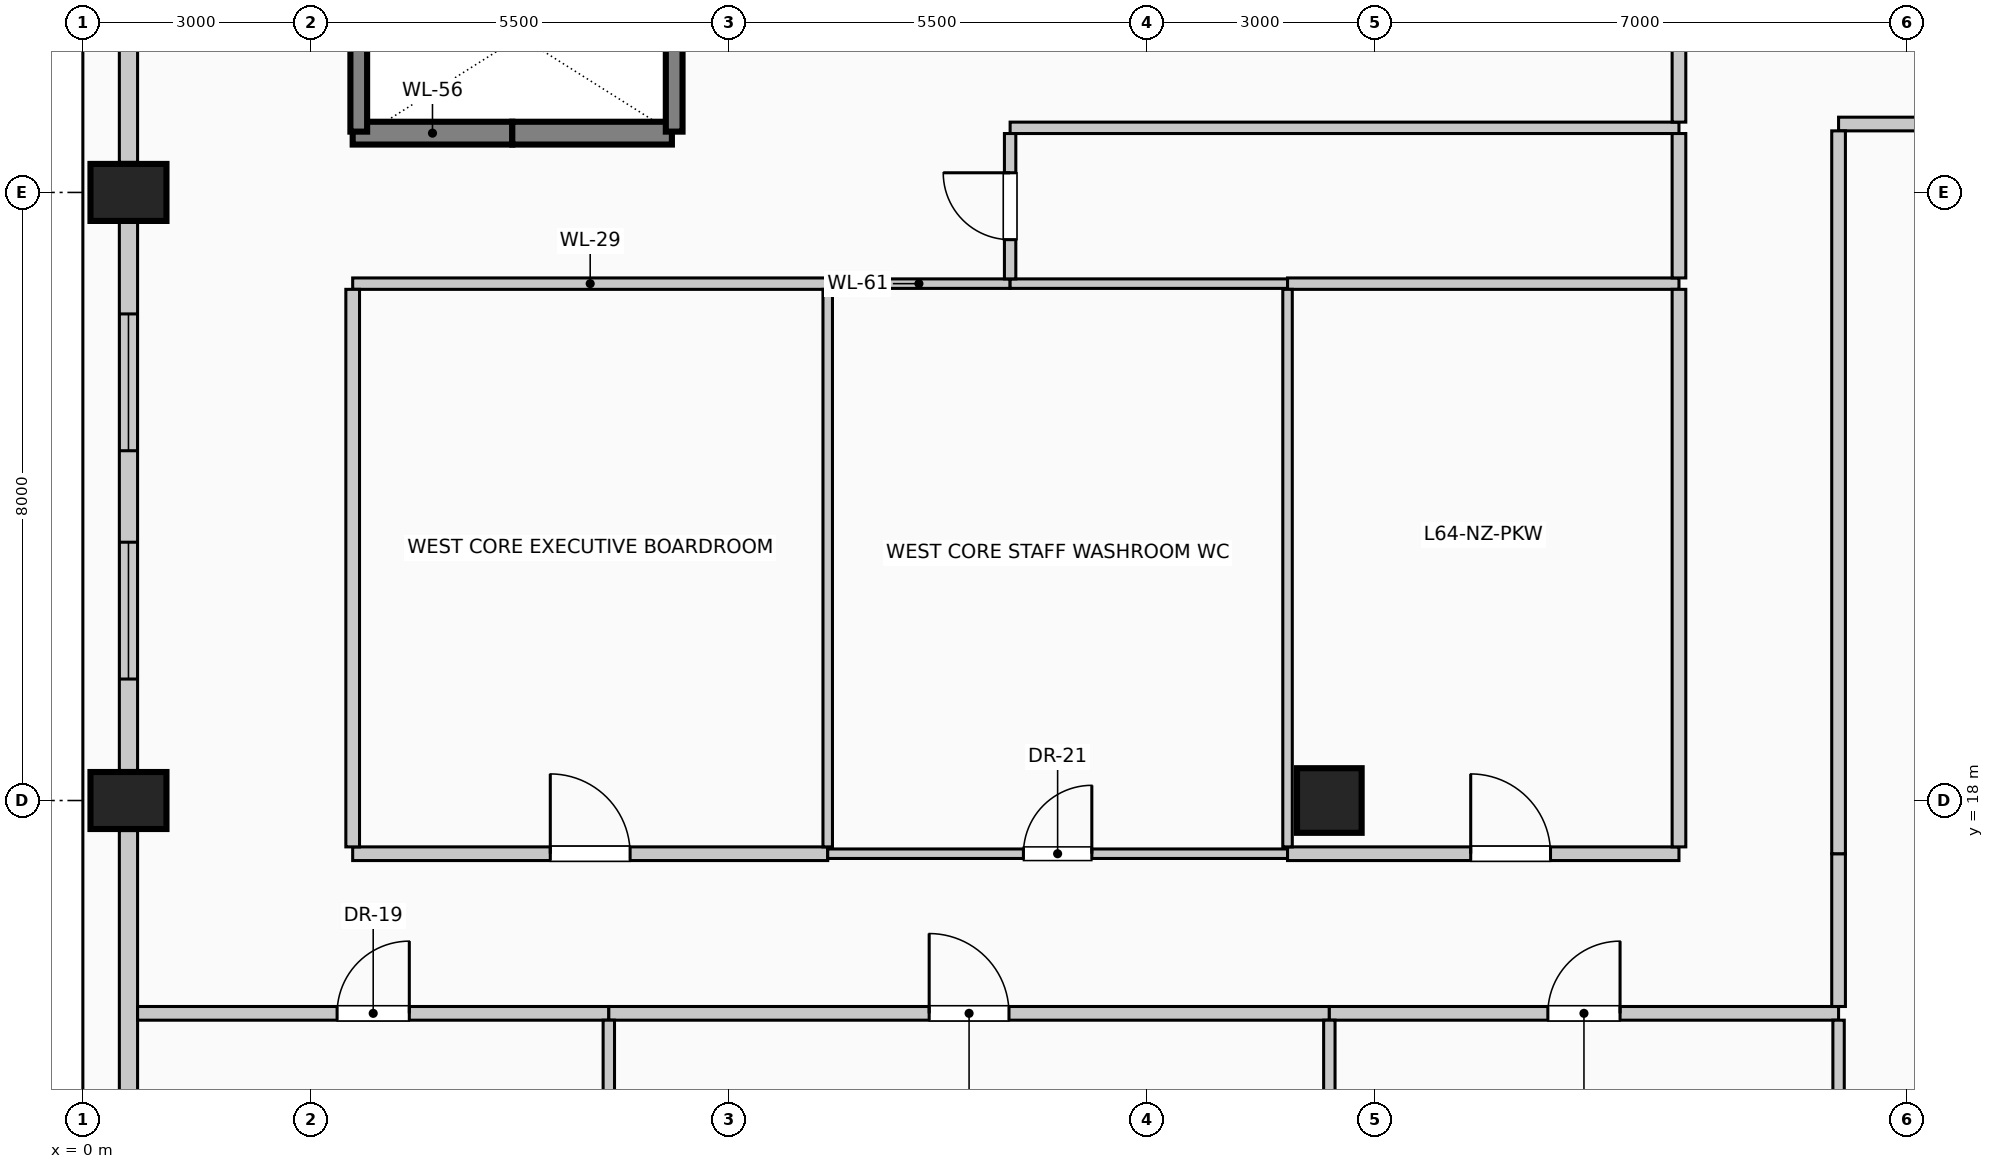
"""IFC4 building model, lengths in metres.
Left out: names, types, materials, properties, quantities, classifications, styles, units other than length and angle.
Written with IfcOpenShell. Run it as: python <this file> out.ifc"""

import sys

from ifc_helpers import new_model, si_unit, direction, frame, frame_2d, origin, origin_2d, place, context, subcontext, project, spatial, rectangle, circle, extrude, element, fill, save


model = new_model("IFC4")
c1 = context("Model", 3, precision=1e-05, world=origin(), true_north=direction((0.0, 1.0)))
c2 = subcontext(c1, "Body", "Model", "MODEL_VIEW")
j1 = project(units=[si_unit("LENGTHUNIT", "METRE"), si_unit("PLANEANGLEUNIT", "RADIAN")], contexts=[c1])
p1 = place(None, origin())
s1 = spatial("IfcSite", under=j1, at=p1, CompositionType="ELEMENT")
p2 = place(p1, origin())
s2 = spatial("IfcBuilding", under=s1, at=p2, CompositionType="ELEMENT")
p3 = place(p2, frame((0.0, 0.0, 264.6)))
s3 = spatial("IfcBuildingStorey", under=s2, at=p3, CompositionType="ELEMENT", Elevation=264.6)
for number, where, z_axis, x_axis in (
    (1, (0.6, 18.0, 0.0), (0.0, 0.0, 1.0), (0.0, 1.0, 0.0)),
    (2, (0.6, 26.0, 0.0), (0.0, 0.0, 1.0), (0.0, 1.0, 0.0)),
):
    element("IfcColumn", number, at=place(p3, frame(where, z_axis=z_axis, x_axis=x_axis)), inside=s3, PredefinedType="COLUMN", context=c2, shape_type="SweptSolid", body=[
        extrude(rectangle(XDim=0.75, YDim=1.0, at=origin_2d()), origin(), (0.0, 0.0, 1.0), 4.0),
    ])
p4 = place(p3, frame((16.4, 18.0, 0.0), z_axis=(0.0, 0.0, 1.0), x_axis=(1.0, 0.0, 0.0)))
e3 = element("IfcColumn", 3, at=p4, inside=s3, PredefinedType="COLUMN", context=c2, shape_type="SweptSolid", body=[
    extrude(circle(Radius=0.425, at=origin_2d()), origin(), (0.0, 0.0, 1.0), 4.0),
])
p5 = place(p3, frame((0.6, 10.395, 0.0), z_axis=(0.0, 0.0, 1.0), x_axis=(0.0, 1.0, 0.0)))
e4 = element("IfcWall", 4, at=p5, inside=s3, PredefinedType="SOLIDWALL", context=c2, shape_type="SweptSolid", body=[
    extrude(rectangle(XDim=7.21, YDim=0.24, at=frame_2d((3.605, 0.0))), origin(), (0.0, 0.0, 1.0), 3.0),
])
p6 = place(p5, frame((1.203, 0.0, 0.42)))
e5 = element("IfcOpeningElement", 5, at=p6, cuts=e4, PredefinedType="OPENING", context=c2, shape_type="SweptSolid", body=[
    extrude(rectangle(XDim=1.8, YDim=2.2, at=frame_2d((0.9, 1.1))), frame((0.0, 0.13, 0.0), z_axis=(0.0, -1.0, 0.0), x_axis=(1.0, 0.0, 0.0)), (0.0, 0.0, 1.0), 0.26),
])
p7 = place(p3, frame((0.6, 18.395, 0.0), z_axis=(0.0, 0.0, 1.0), x_axis=(0.0, 1.0, 0.0)))
e6 = element("IfcWall", 6, at=p7, inside=s3, PredefinedType="SOLIDWALL", context=c2, shape_type="SweptSolid", body=[
    extrude(rectangle(XDim=7.21, YDim=0.24, at=frame_2d((3.605, 0.0))), origin(), (0.0, 0.0, 1.0), 3.0),
])
p8 = place(p7, frame((1.203, 0.0, 0.42)))
e7 = element("IfcOpeningElement", 7, at=p8, cuts=e6, PredefinedType="OPENING", context=c2, shape_type="SweptSolid", body=[
    extrude(rectangle(XDim=1.8, YDim=2.2, at=frame_2d((0.9, 1.1))), frame((0.0, 0.13, 0.0), z_axis=(0.0, -1.0, 0.0), x_axis=(1.0, 0.0, 0.0)), (0.0, 0.0, 1.0), 0.26),
])
p9 = place(p7, frame((4.207, 0.0, 0.42)))
e8 = element("IfcOpeningElement", 8, at=p9, cuts=e6, PredefinedType="OPENING", context=c2, shape_type="SweptSolid", body=[
    extrude(rectangle(XDim=1.8, YDim=2.2, at=frame_2d((0.9, 1.1))), frame((0.0, 0.13, 0.0), z_axis=(0.0, -1.0, 0.0), x_axis=(1.0, 0.0, 0.0)), (0.0, 0.0, 1.0), 0.26),
])
p10 = place(p3, frame((0.6, 26.395, 0.0), z_axis=(0.0, 0.0, 1.0), x_axis=(0.0, 1.0, 0.0)))
e9 = element("IfcWall", 9, at=p10, inside=s3, PredefinedType="SOLIDWALL", context=c2, shape_type="SweptSolid", body=[
    extrude(rectangle(XDim=7.21, YDim=0.24, at=frame_2d((3.605, 0.0))), origin(), (0.0, 0.0, 1.0), 3.0),
])
p11 = place(p3, frame((5.65, 26.78, 0.0), z_axis=(0.0, 0.0, 1.0), x_axis=(-1.0, 0.0, 0.0)))
e10 = element("IfcWall", 10, at=p11, inside=s3, PredefinedType="SOLIDWALL", context=c2, shape_type="SweptSolid", body=[
    extrude(rectangle(XDim=2.1, YDim=0.3, at=frame_2d((1.05, 0.0))), origin(), (0.0, 0.0, 1.0), 4.0),
])
p12 = place(p3, frame((7.75, 26.78, 0.0), z_axis=(0.0, 0.0, 1.0), x_axis=(-1.0, 0.0, 0.0)))
e11 = element("IfcWall", 11, at=p12, inside=s3, PredefinedType="SOLIDWALL", context=c2, shape_type="SweptSolid", body=[
    extrude(rectangle(XDim=2.1, YDim=0.3, at=frame_2d((1.05, 0.0))), origin(), (0.0, 0.0, 1.0), 4.0),
])
p13 = place(p3, frame((3.63, 26.8, 0.0), z_axis=(0.0, 0.0, 1.0), x_axis=(0.0, 1.0, 0.0)))
e12 = element("IfcWall", 12, at=p13, inside=s3, PredefinedType="SOLIDWALL", context=c2, shape_type="SweptSolid", body=[
    extrude(rectangle(XDim=5.55, YDim=0.22, at=frame_2d((2.775, 0.0))), origin(), (0.0, 0.0, 1.0), 4.0),
])
p14 = place(p3, frame((7.78, 26.8, 0.0), z_axis=(0.0, 0.0, 1.0), x_axis=(0.0, 1.0, 0.0)))
e13 = element("IfcWall", 13, at=p14, inside=s3, PredefinedType="SOLIDWALL", context=c2, shape_type="SweptSolid", body=[
    extrude(rectangle(XDim=2.8, YDim=0.22, at=frame_2d((1.4, 0.0))), origin(), (0.0, 0.0, 1.0), 4.0),
])
p15 = place(p3, frame((0.72, 15.2, 0.0), z_axis=(0.0, 0.0, 1.0), x_axis=(1.0, 0.0, 0.0)))
e14 = element("IfcWall", 14, at=p15, inside=s3, PredefinedType="PARTITIONING", context=c2, shape_type="SweptSolid", body=[
    extrude(rectangle(XDim=6.2, YDim=0.18, at=frame_2d((3.1, 0.0))), origin(), (0.0, 0.0, 1.0), 3.75),
])
p16 = place(p15, frame((2.625, 0.0, 0.0)))
e15 = element("IfcOpeningElement", 15, at=p16, cuts=e14, PredefinedType="OPENING", context=c2, shape_type="SweptSolid", body=[
    extrude(rectangle(XDim=0.95, YDim=2.15, at=frame_2d((0.475, 1.075))), frame((0.0, 0.1, 0.0), z_axis=(0.0, -1.0, 0.0), x_axis=(1.0, 0.0, 0.0)), (0.0, 0.0, 1.0), 0.2),
])
p17 = place(p3, frame((6.92, 15.2, 0.0), z_axis=(0.0, 0.0, 1.0), x_axis=(1.0, 0.0, 0.0)))
e16 = element("IfcWall", 16, at=p17, inside=s3, PredefinedType="PARTITIONING", context=c2, shape_type="SweptSolid", body=[
    extrude(rectangle(XDim=9.48, YDim=0.18, at=frame_2d((4.74, 0.0))), origin(), (0.0, 0.0, 1.0), 3.75),
])
p18 = place(p17, frame((4.215, 0.0, 0.0)))
e17 = element("IfcOpeningElement", 17, at=p18, cuts=e16, PredefinedType="OPENING", context=c2, shape_type="SweptSolid", body=[
    extrude(rectangle(XDim=1.05, YDim=2.15, at=frame_2d((0.525, 1.075))), frame((0.0, 0.1, 0.0), z_axis=(0.0, -1.0, 0.0), x_axis=(1.0, 0.0, 0.0)), (0.0, 0.0, 1.0), 0.2),
])
p19 = place(p3, frame((16.4, 15.2, 0.0), z_axis=(0.0, 0.0, 1.0), x_axis=(1.0, 0.0, 0.0)))
e18 = element("IfcWall", 18, at=p19, inside=s3, PredefinedType="PARTITIONING", context=c2, shape_type="SweptSolid", body=[
    extrude(rectangle(XDim=6.7, YDim=0.18, at=frame_2d((3.35, 0.0))), origin(), (0.0, 0.0, 1.0), 3.75),
])
p20 = place(p19, frame((2.875, 0.0, 0.0)))
e19 = element("IfcOpeningElement", 19, at=p20, cuts=e18, PredefinedType="OPENING", context=c2, shape_type="SweptSolid", body=[
    extrude(rectangle(XDim=0.95, YDim=2.15, at=frame_2d((0.475, 1.075))), frame((0.0, 0.1, 0.0), z_axis=(0.0, -1.0, 0.0), x_axis=(1.0, 0.0, 0.0)), (0.0, 0.0, 1.0), 0.2),
])
p21 = place(p3, frame((3.55, 17.3, 0.0), z_axis=(0.0, 0.0, 1.0), x_axis=(1.0, 0.0, 0.0)))
e20 = element("IfcWall", 20, at=p21, inside=s3, PredefinedType="PARTITIONING", context=c2, shape_type="SweptSolid", body=[
    extrude(rectangle(XDim=6.25, YDim=0.18, at=frame_2d((3.125, 0.0))), origin(), (0.0, 0.0, 1.0), 3.75),
])
p22 = place(p21, frame((2.6, 0.0, 0.0)))
e21 = element("IfcOpeningElement", 21, at=p22, cuts=e20, PredefinedType="OPENING", context=c2, shape_type="SweptSolid", body=[
    extrude(rectangle(XDim=1.05, YDim=2.15, at=frame_2d((0.525, 1.075))), frame((0.0, 0.1, 0.0), z_axis=(0.0, -1.0, 0.0), x_axis=(1.0, 0.0, 0.0)), (0.0, 0.0, 1.0), 0.2),
])
p23 = place(p3, frame((9.8, 17.3, 0.0), z_axis=(0.0, 0.0, 1.0), x_axis=(1.0, 0.0, 0.0)))
e22 = element("IfcWall", 22, at=p23, inside=s3, PredefinedType="PARTITIONING", context=c2, shape_type="SweptSolid", body=[
    extrude(rectangle(XDim=6.05, YDim=0.125, at=frame_2d((3.025, 0.0))), origin(), (0.0, 0.0, 1.0), 3.75),
])
p24 = place(p23, frame((2.575, 0.0, 0.0)))
e23 = element("IfcOpeningElement", 23, at=p24, cuts=e22, PredefinedType="OPENING", context=c2, shape_type="SweptSolid", body=[
    extrude(rectangle(XDim=0.9, YDim=2.1, at=frame_2d((0.45, 1.05))), frame((0.0, 0.073, 0.0), z_axis=(0.0, -1.0, 0.0), x_axis=(1.0, 0.0, 0.0)), (0.0, 0.0, 1.0), 0.145),
])
p25 = place(p3, frame((15.85, 17.3, 0.0), z_axis=(0.0, 0.0, 1.0), x_axis=(1.0, 0.0, 0.0)))
e24 = element("IfcWall", 24, at=p25, inside=s3, PredefinedType="PARTITIONING", context=c2, shape_type="SweptSolid", body=[
    extrude(rectangle(XDim=5.15, YDim=0.18, at=frame_2d((2.575, 0.0))), origin(), (0.0, 0.0, 1.0), 3.75),
])
p26 = place(p25, frame((2.41, 0.0, 0.0)))
e25 = element("IfcOpeningElement", 25, at=p26, cuts=e24, PredefinedType="OPENING", context=c2, shape_type="SweptSolid", body=[
    extrude(rectangle(XDim=1.05, YDim=2.15, at=frame_2d((0.525, 1.075))), frame((0.0, 0.1, 0.0), z_axis=(0.0, -1.0, 0.0), x_axis=(1.0, 0.0, 0.0)), (0.0, 0.0, 1.0), 0.2),
])
p27 = place(p3, frame((3.55, 24.8, 0.0), z_axis=(0.0, 0.0, 1.0), x_axis=(1.0, 0.0, 0.0)))
e26 = element("IfcWall", 26, at=p27, inside=s3, PredefinedType="PARTITIONING", context=c2, shape_type="SweptSolid", body=[
    extrude(rectangle(XDim=6.25, YDim=0.15, at=frame_2d((3.125, 0.0))), origin(), (0.0, 0.0, 1.0), 3.75),
])
p28 = place(p3, frame((9.8, 24.8, 0.0), z_axis=(0.0, 0.0, 1.0), x_axis=(1.0, 0.0, 0.0)))
e27 = element("IfcWall", 27, at=p28, inside=s3, PredefinedType="PARTITIONING", context=c2, shape_type="SweptSolid", body=[
    extrude(rectangle(XDim=2.4, YDim=0.125, at=frame_2d((1.2, 0.0))), origin(), (0.0, 0.0, 1.0), 3.75),
])
p29 = place(p3, frame((12.2, 24.8, 0.0), z_axis=(0.0, 0.0, 1.0), x_axis=(1.0, 0.0, 0.0)))
e28 = element("IfcWall", 28, at=p29, inside=s3, PredefinedType="PARTITIONING", context=c2, shape_type="SweptSolid", body=[
    extrude(rectangle(XDim=3.65, YDim=0.125, at=frame_2d((1.825, 0.0))), origin(), (0.0, 0.0, 1.0), 3.75),
])
p30 = place(p3, frame((15.85, 24.8, 0.0), z_axis=(0.0, 0.0, 1.0), x_axis=(1.0, 0.0, 0.0)))
e29 = element("IfcWall", 29, at=p30, inside=s3, PredefinedType="PARTITIONING", context=c2, shape_type="SweptSolid", body=[
    extrude(rectangle(XDim=5.15, YDim=0.15, at=frame_2d((2.575, 0.0))), origin(), (0.0, 0.0, 1.0), 3.75),
])
p31 = place(p3, frame((12.2, 26.85, 0.0), z_axis=(0.0, 0.0, 1.0), x_axis=(1.0, 0.0, 0.0)))
e30 = element("IfcWall", 30, at=p31, inside=s3, PredefinedType="PARTITIONING", context=c2, shape_type="SweptSolid", body=[
    extrude(rectangle(XDim=8.8, YDim=0.15, at=frame_2d((4.4, 0.0))), origin(), (0.0, 0.0, 1.0), 3.75),
])
p32 = place(p3, frame((23.1, 26.9, 0.0), z_axis=(0.0, 0.0, 1.0), x_axis=(1.0, 0.0, 0.0)))
e31 = element("IfcWall", 31, at=p32, inside=s3, PredefinedType="PARTITIONING", context=c2, shape_type="SweptSolid", body=[
    extrude(rectangle(XDim=4.12, YDim=0.18, at=frame_2d((2.06, 0.0))), origin(), (0.0, 0.0, 1.0), 3.75),
])
p33 = place(p32, frame((1.535, 0.0, 0.0)))
e32 = element("IfcOpeningElement", 32, at=p33, cuts=e31, PredefinedType="OPENING", context=c2, shape_type="SweptSolid", body=[
    extrude(rectangle(XDim=1.05, YDim=2.15, at=frame_2d((0.525, 1.075))), frame((0.0, 0.1, 0.0), z_axis=(0.0, -1.0, 0.0), x_axis=(1.0, 0.0, 0.0)), (0.0, 0.0, 1.0), 0.2),
])
p34 = place(p3, frame((3.55, 17.39, 0.0), z_axis=(0.0, 0.0, 1.0), x_axis=(0.0, 1.0, 0.0)))
e33 = element("IfcWall", 33, at=p34, inside=s3, PredefinedType="PARTITIONING", context=c2, shape_type="SweptSolid", body=[
    extrude(rectangle(XDim=7.335, YDim=0.18, at=frame_2d((3.667, 0.0))), origin(), (0.0, 0.0, 1.0), 3.75),
])
p35 = place(p3, frame((6.92, 0.72, 0.0), z_axis=(0.0, 0.0, 1.0), x_axis=(0.0, 1.0, 0.0)))
e34 = element("IfcWall", 34, at=p35, inside=s3, PredefinedType="PARTITIONING", context=c2, shape_type="SweptSolid", body=[
    extrude(rectangle(XDim=14.39, YDim=0.15, at=frame_2d((7.195, 0.0))), origin(), (0.0, 0.0, 1.0), 3.75),
])
p36 = place(p3, frame((9.8, 17.39, 0.0), z_axis=(0.0, 0.0, 1.0), x_axis=(0.0, 1.0, 0.0)))
e35 = element("IfcWall", 35, at=p36, inside=s3, PredefinedType="PARTITIONING", context=c2, shape_type="SweptSolid", body=[
    extrude(rectangle(XDim=7.335, YDim=0.125, at=frame_2d((3.667, 0.0))), origin(), (0.0, 0.0, 1.0), 3.75),
])
p37 = place(p3, frame((12.2, 24.863, 0.0), z_axis=(0.0, 0.0, 1.0), x_axis=(0.0, 1.0, 0.0)))
e36 = element("IfcWall", 36, at=p37, inside=s3, PredefinedType="PARTITIONING", context=c2, shape_type="SweptSolid", body=[
    extrude(rectangle(XDim=1.912, YDim=0.15, at=frame_2d((0.956, 0.0))), origin(), (0.0, 0.0, 1.0), 3.75),
])
p38 = place(p37, frame((0.516, 0.0, 0.0)))
e37 = element("IfcOpeningElement", 37, at=p38, cuts=e36, PredefinedType="OPENING", context=c2, shape_type="SweptSolid", body=[
    extrude(rectangle(XDim=0.88, YDim=2.1, at=frame_2d((0.44, 1.05))), frame((0.0, 0.085, 0.0), z_axis=(0.0, -1.0, 0.0), x_axis=(1.0, 0.0, 0.0)), (0.0, 0.0, 1.0), 0.17),
])
p39 = place(p3, frame((15.85, 17.39, 0.0), z_axis=(0.0, 0.0, 1.0), x_axis=(0.0, 1.0, 0.0)))
e38 = element("IfcWall", 38, at=p39, inside=s3, PredefinedType="PARTITIONING", context=c2, shape_type="SweptSolid", body=[
    extrude(rectangle(XDim=7.335, YDim=0.125, at=frame_2d((3.667, 0.0))), origin(), (0.0, 0.0, 1.0), 3.75),
])
p40 = place(p3, frame((16.4, 1.25, 0.0), z_axis=(0.0, 0.0, 1.0), x_axis=(0.0, 1.0, 0.0)))
e39 = element("IfcWall", 39, at=p40, inside=s3, PredefinedType="PARTITIONING", context=c2, shape_type="SweptSolid", body=[
    extrude(rectangle(XDim=13.86, YDim=0.15, at=frame_2d((6.93, 0.0))), origin(), (0.0, 0.0, 1.0), 3.195),
])
p41 = place(p3, frame((21.0, 17.39, 0.0), z_axis=(0.0, 0.0, 1.0), x_axis=(0.0, 1.0, 0.0)))
e40 = element("IfcWall", 40, at=p41, inside=s3, PredefinedType="PARTITIONING", context=c2, shape_type="SweptSolid", body=[
    extrude(rectangle(XDim=7.335, YDim=0.18, at=frame_2d((3.667, 0.0))), origin(), (0.0, 0.0, 1.0), 3.75),
])
p42 = place(p3, frame((21.0, 24.875, 0.0), z_axis=(0.0, 0.0, 1.0), x_axis=(0.0, 1.0, 0.0)))
e41 = element("IfcWall", 41, at=p42, inside=s3, PredefinedType="PARTITIONING", context=c2, shape_type="SweptSolid", body=[
    extrude(rectangle(XDim=1.9, YDim=0.18, at=frame_2d((0.95, 0.0))), origin(), (0.0, 0.0, 1.0), 3.75),
])
p43 = place(p3, frame((21.0, 26.925, 0.0), z_axis=(0.0, 0.0, 1.0), x_axis=(0.0, 1.0, 0.0)))
e42 = element("IfcWall", 42, at=p43, inside=s3, PredefinedType="PARTITIONING", context=c2, shape_type="SweptSolid", body=[
    extrude(rectangle(XDim=5.335, YDim=0.18, at=frame_2d((2.667, 0.0))), origin(), (0.0, 0.0, 1.0), 3.75),
])
p44 = place(p3, frame((23.1, 0.72, 0.0), z_axis=(0.0, 0.0, 1.0), x_axis=(0.0, 1.0, 0.0)))
e43 = element("IfcWall", 43, at=p44, inside=s3, PredefinedType="PARTITIONING", context=c2, shape_type="SweptSolid", body=[
    extrude(rectangle(XDim=14.39, YDim=0.15, at=frame_2d((7.195, 0.0))), origin(), (0.0, 0.0, 1.0), 3.75),
])
p45 = place(p3, frame((23.1, 15.29, 0.0), z_axis=(0.0, 0.0, 1.0), x_axis=(0.0, 1.0, 0.0)))
e44 = element("IfcWall", 44, at=p45, inside=s3, PredefinedType="PARTITIONING", context=c2, shape_type="SweptSolid", body=[
    extrude(rectangle(XDim=2.01, YDim=0.18, at=frame_2d((1.005, 0.0))), origin(), (0.0, 0.0, 1.0), 3.75),
])
p46 = place(p3, frame((23.1, 17.3, 0.0), z_axis=(0.0, 0.0, 1.0), x_axis=(0.0, 1.0, 0.0)))
e45 = element("IfcWall", 45, at=p46, inside=s3, PredefinedType="PARTITIONING", context=c2, shape_type="SweptSolid", body=[
    extrude(rectangle(XDim=9.51, YDim=0.18, at=frame_2d((4.755, 0.0))), origin(), (0.0, 0.0, 1.0), 3.75),
])
p47 = place(p8, origin())
e46 = element("IfcWindow", 46, at=p47, inside=s3, PartitioningType="SINGLE_PANEL", PredefinedType="WINDOW", context=c2, shape_type="SweptSolid", body=[
    extrude(rectangle(XDim=1.8, YDim=2.2, at=frame_2d((0.9, 1.1))), frame((0.0, 0.03, 0.0), z_axis=(0.0, -1.0, 0.0), x_axis=(1.0, 0.0, 0.0)), (0.0, 0.0, 1.0), 0.06),
])
fill(e7, e46)
p48 = place(p9, origin())
e47 = element("IfcWindow", 47, at=p48, inside=s3, PartitioningType="SINGLE_PANEL", PredefinedType="WINDOW", context=c2, shape_type="SweptSolid", body=[
    extrude(rectangle(XDim=1.8, YDim=2.2, at=frame_2d((0.9, 1.1))), frame((0.0, 0.03, 0.0), z_axis=(0.0, -1.0, 0.0), x_axis=(1.0, 0.0, 0.0)), (0.0, 0.0, 1.0), 0.06),
])
fill(e8, e47)
p49 = place(p16, origin())
e48 = element("IfcDoor", 48, at=p49, inside=s3, OperationType="SINGLE_SWING_RIGHT", PredefinedType="DOOR", context=c2, shape_type="SweptSolid", body=[
    extrude(rectangle(XDim=0.95, YDim=2.15, at=frame_2d((0.475, 1.075))), frame((0.0, 0.025, 0.0), z_axis=(0.0, -1.0, 0.0), x_axis=(1.0, 0.0, 0.0)), (0.0, 0.0, 1.0), 0.05),
])
fill(e15, e48)
p50 = place(p18, origin())
e49 = element("IfcDoor", 49, at=p50, inside=s3, OperationType="SINGLE_SWING_LEFT", PredefinedType="DOOR", context=c2, shape_type="SweptSolid", body=[
    extrude(rectangle(XDim=1.05, YDim=2.15, at=frame_2d((0.525, 1.075))), frame((0.0, 0.025, 0.0), z_axis=(0.0, -1.0, 0.0), x_axis=(1.0, 0.0, 0.0)), (0.0, 0.0, 1.0), 0.05),
])
fill(e17, e49)
p51 = place(p20, origin())
e50 = element("IfcDoor", 50, at=p51, inside=s3, OperationType="SINGLE_SWING_RIGHT", PredefinedType="DOOR", context=c2, shape_type="SweptSolid", body=[
    extrude(rectangle(XDim=0.95, YDim=2.15, at=frame_2d((0.475, 1.075))), frame((0.0, 0.025, 0.0), z_axis=(0.0, -1.0, 0.0), x_axis=(1.0, 0.0, 0.0)), (0.0, 0.0, 1.0), 0.05),
])
fill(e19, e50)
p52 = place(p22, origin())
e51 = element("IfcDoor", 51, at=p52, inside=s3, OperationType="SINGLE_SWING_LEFT", PredefinedType="DOOR", context=c2, shape_type="SweptSolid", body=[
    extrude(rectangle(XDim=1.05, YDim=2.15, at=frame_2d((0.525, 1.075))), frame((0.0, 0.025, 0.0), z_axis=(0.0, -1.0, 0.0), x_axis=(1.0, 0.0, 0.0)), (0.0, 0.0, 1.0), 0.05),
])
fill(e21, e51)
p53 = place(p24, origin())
e52 = element("IfcDoor", 52, at=p53, inside=s3, OperationType="SINGLE_SWING_RIGHT", PredefinedType="DOOR", context=c2, shape_type="SweptSolid", body=[
    extrude(rectangle(XDim=0.9, YDim=2.1, at=frame_2d((0.45, 1.05))), frame((0.0, 0.025, 0.0), z_axis=(0.0, -1.0, 0.0), x_axis=(1.0, 0.0, 0.0)), (0.0, 0.0, 1.0), 0.05),
])
fill(e23, e52)
p54 = place(p26, origin())
e53 = element("IfcDoor", 53, at=p54, inside=s3, OperationType="SINGLE_SWING_LEFT", PredefinedType="DOOR", context=c2, shape_type="SweptSolid", body=[
    extrude(rectangle(XDim=1.05, YDim=2.15, at=frame_2d((0.525, 1.075))), frame((0.0, 0.025, 0.0), z_axis=(0.0, -1.0, 0.0), x_axis=(1.0, 0.0, 0.0)), (0.0, 0.0, 1.0), 0.05),
])
fill(e25, e53)
p55 = place(p38, origin())
e54 = element("IfcDoor", 54, at=p55, inside=s3, OperationType="SINGLE_SWING_RIGHT", PredefinedType="DOOR", context=c2, shape_type="SweptSolid", body=[
    extrude(rectangle(XDim=0.88, YDim=2.1, at=frame_2d((0.44, 1.05))), frame((0.0, 0.025, 0.0), z_axis=(0.0, -1.0, 0.0), x_axis=(1.0, 0.0, 0.0)), (0.0, 0.0, 1.0), 0.05),
])
fill(e37, e54)
save(model, sys.argv[1])
